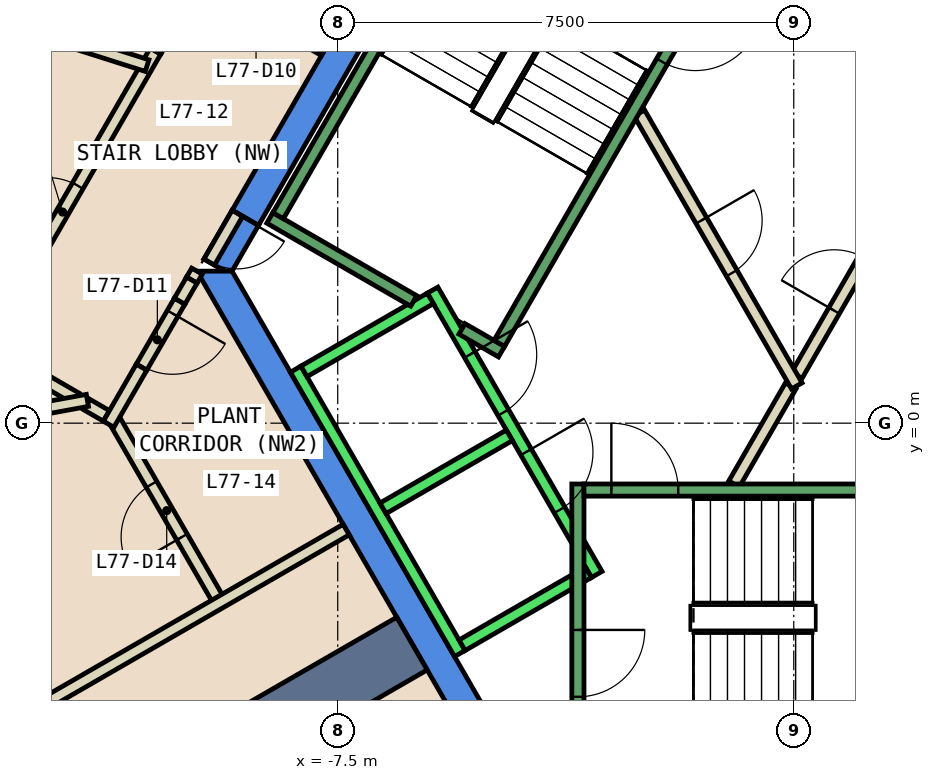
"""IFC4 building model, lengths in metres.
Left out: names, types, materials, properties, quantities, classifications, styles, units other than length and angle.
Written with IfcOpenShell. Run it as: python <this file> out.ifc"""

import sys

from ifc_helpers import new_model, si_unit, direction, frame, frame_2d, origin, place, context, subcontext, project, spatial, polyline, rectangle, outline, extrude, element, fill, save


model = new_model("IFC4")
c1 = context("Model", 3, precision=1e-05, world=origin(), true_north=direction((0.0, 1.0)))
c2 = subcontext(c1, "Body", "Model", "MODEL_VIEW")
j1 = project(units=[si_unit("LENGTHUNIT", "METRE"), si_unit("PLANEANGLEUNIT", "RADIAN")], contexts=[c1])
p1 = place(None, origin())
s1 = spatial("IfcSite", under=j1, at=p1, CompositionType="ELEMENT")
p2 = place(p1, origin())
s2 = spatial("IfcBuilding", under=s1, at=p2, CompositionType="ELEMENT")
p3 = place(p2, frame((0.0, 0.0, 326.0)))
s3 = spatial("IfcBuildingStorey", under=s2, at=p3, CompositionType="ELEMENT", Elevation=326.0)
p4 = place(p3, frame((0.0, 0.0, -0.6)))
e1 = element("IfcWall", 1, at=p4, inside=s3, PredefinedType="SHEAR", context=c2, shape_type="SweptSolid", body=[
    extrude(outline(polyline([(-9.236, 3.502), (-8.803, 3.253), (-4.619, 10.5), (-4.907, 11.0), (-9.236, 3.502)])), origin(), (0.0, 0.0, 1.0), 5.55),
])
p5 = place(p3, frame((0.0, 0.0, 3.6)))
e2 = element("IfcWall", 2, at=p5, inside=s3, PredefinedType="SHEAR", context=c2, shape_type="SweptSolid", body=[
    extrude(outline(polyline([(-9.7, 2.7), (-9.354, 2.5), (-9.238, 2.5), (-8.803, 3.253), (-9.236, 3.502), (-9.7, 2.7)])), origin(), (0.0, 0.0, 1.0), 1.35),
])
p6 = place(p3, frame((0.0, 0.0, -0.6)))
e3 = element("IfcWall", 3, at=p6, inside=s3, PredefinedType="SHEAR", context=c2, shape_type="SweptSolid", body=[
    extrude(outline(polyline([(-9.815, 2.5), (-4.907, -6.0), (-4.619, -5.5), (-9.238, 2.5), (-9.815, 2.5)])), origin(), (0.0, 0.0, 1.0), 5.55),
])
p7 = place(p3, frame((-6.279, -3.625, 0.0), z_axis=(0.0, 0.0, 1.0), x_axis=(-0.866025543801, -0.499999757484, 0.0)))
e4 = element("IfcWall", 4, at=p7, inside=s3, PredefinedType="SHEAR", context=c2, shape_type="SweptSolid", body=[
    extrude(rectangle(XDim=17.452, YDim=1.0, at=frame_2d((8.726, 0.0))), origin(), (0.0, 0.0, 1.0), 4.95),
])
p8 = place(p3, frame((-0.982, -1.0, 0.0), z_axis=(0.0, 0.0, 1.0), x_axis=(0.50024047865, 0.865886518847, 0.0)))
e5 = element("IfcWall", 5, at=p8, inside=s3, PredefinedType="PARTITIONING", context=c2, shape_type="SweptSolid", body=[
    extrude(rectangle(XDim=1.863, YDim=0.2, at=frame_2d((0.931, 0.0))), origin(), (0.0, 0.0, 1.0), 4.95),
])
p9 = place(p3, frame((0.05, 0.787, 0.0), z_axis=(0.0, 0.0, 1.0), x_axis=(0.499954076797, 0.866051915934, 0.0)))
e6 = element("IfcWall", 6, at=p9, inside=s3, PredefinedType="PARTITIONING", context=c2, shape_type="SweptSolid", body=[
    extrude(rectangle(XDim=3.558, YDim=0.2, at=frame_2d((1.779, 0.0))), origin(), (0.0, 0.0, 1.0), 4.95),
])
p10 = place(p9, frame((1.229, 0.0, 0.0)))
e7 = element("IfcOpeningElement", 7, at=p10, cuts=e6, PredefinedType="OPENING", context=c2, shape_type="SweptSolid", body=[
    extrude(rectangle(XDim=1.0, YDim=2.1, at=frame_2d((0.5, 1.05))), frame((0.0, 0.11, 0.0), z_axis=(0.0, -1.0, 0.0), x_axis=(1.0, 0.0, 0.0)), (0.0, 0.0, 1.0), 0.22),
])
p11 = place(p3, frame((-2.54, 5.1, 0.0), z_axis=(0.0, 0.0, 1.0), x_axis=(0.499925051871, -0.866068670783, 0.0)))
e8 = element("IfcWall", 8, at=p11, inside=s3, PredefinedType="PARTITIONING", context=c2, shape_type="SweptSolid", body=[
    extrude(rectangle(XDim=5.181, YDim=0.2, at=frame_2d((2.59, 0.0))), origin(), (0.0, 0.0, 1.0), 4.95),
])
p12 = place(p11, frame((2.04, 0.0, 0.0)))
e9 = element("IfcOpeningElement", 9, at=p12, cuts=e8, PredefinedType="OPENING", context=c2, shape_type="SweptSolid", body=[
    extrude(rectangle(XDim=1.0, YDim=2.1, at=frame_2d((0.5, 1.05))), frame((0.0, 0.11, 0.0), z_axis=(0.0, -1.0, 0.0), x_axis=(1.0, 0.0, 0.0)), (0.0, 0.0, 1.0), 0.22),
])
p13 = place(p3, frame((-9.796, 7.332, 0.0), z_axis=(0.0, 0.0, 1.0), x_axis=(0.865973769406, -0.500089422704, 0.0)))
e10 = element("IfcWall", 10, at=p13, inside=s3, PredefinedType="PARTITIONING", context=c2, shape_type="SweptSolid", body=[
    extrude(rectangle(XDim=2.399, YDim=0.2, at=frame_2d((1.2, 0.0))), origin(), (0.0, 0.0, 1.0), 4.95),
])
p14 = place(p13, frame((0.6, 0.0, 0.0)))
e11 = element("IfcOpeningElement", 11, at=p14, cuts=e10, PredefinedType="OPENING", context=c2, shape_type="SweptSolid", body=[
    extrude(rectangle(XDim=1.0, YDim=2.1, at=frame_2d((0.5, 1.05))), frame((0.0, 0.11, 0.0), z_axis=(0.0, -1.0, 0.0), x_axis=(1.0, 0.0, 0.0)), (0.0, 0.0, 1.0), 0.22),
])
p15 = place(p3, frame((-9.815, 2.5, 0.0), z_axis=(0.0, 0.0, 1.0), x_axis=(-0.5004692653, -0.865754303766, 0.0)))
e12 = element("IfcWall", 12, at=p15, inside=s3, PredefinedType="PARTITIONING", context=c2, shape_type="SweptSolid", body=[
    extrude(rectangle(XDim=0.17, YDim=0.2, at=frame_2d((0.085, 0.0))), origin(), (0.0, 0.0, 1.0), 2.4),
])
p16 = place(p3, frame((-11.802, 0.407, 0.0), z_axis=(0.0, 0.0, 1.0), x_axis=(-0.865911816314, 0.500196687681, 0.0)))
e13 = element("IfcWall", 13, at=p16, inside=s3, PredefinedType="PARTITIONING", context=c2, shape_type="SweptSolid", body=[
    extrude(rectangle(XDim=0.654, YDim=0.2, at=frame_2d((0.327, 0.0))), origin(), (0.0, 0.0, 1.0), 4.95),
])
p17 = place(p3, frame((-11.305, 0.12, 0.0), z_axis=(0.0, 0.0, 1.0), x_axis=(-0.865694957185, 0.500571914019, 0.0)))
e14 = element("IfcWall", 14, at=p17, inside=s3, PredefinedType="PARTITIONING", context=c2, shape_type="SweptSolid", body=[
    extrude(rectangle(XDim=0.373, YDim=0.2, at=frame_2d((0.187, 0.0))), origin(), (0.0, 0.0, 1.0), 4.95),
])
p18 = place(p3, frame((-9.44, -2.95, 0.0), z_axis=(0.0, 0.0, 1.0), x_axis=(-0.500008478926, 0.866020508419, 0.0)))
e15 = element("IfcWall", 15, at=p18, inside=s3, PredefinedType="PARTITIONING", context=c2, shape_type="SweptSolid", body=[
    extrude(rectangle(XDim=3.522, YDim=0.2, at=frame_2d((1.761, 0.0))), origin(), (0.0, 0.0, 1.0), 4.95),
])
p19 = place(p18, frame((1.245, 0.0, 0.0)))
e16 = element("IfcOpeningElement", 16, at=p19, cuts=e15, PredefinedType="OPENING", context=c2, shape_type="SweptSolid", body=[
    extrude(rectangle(XDim=1.0, YDim=2.1, at=frame_2d((0.5, 1.05))), frame((0.0, 0.11, 0.0), z_axis=(0.0, -1.0, 0.0), x_axis=(1.0, 0.0, 0.0)), (0.0, 0.0, 1.0), 0.22),
])
p20 = place(p3, frame((-11.617, 0.375, 0.0), z_axis=(0.0, 0.0, 1.0), x_axis=(-0.983680709819, -0.179922931086, 0.0)))
e17 = element("IfcWall", 17, at=p20, inside=s3, PredefinedType="PARTITIONING", context=c2, shape_type="SweptSolid", body=[
    extrude(rectangle(XDim=9.732, YDim=0.2, at=frame_2d((4.866, 0.0))), origin(), (0.0, 0.0, 1.0), 4.95),
])
p21 = place(p3, frame((-9.15, 3.452, 0.0), z_axis=(0.0, 0.0, 1.0), x_axis=(-0.500079945886, -0.865979242085, 0.0)))
e18 = element("IfcWall", 18, at=p21, inside=s3, PredefinedType="PARTITIONING", context=c2, shape_type="SweptSolid", body=[
    extrude(rectangle(XDim=0.926, YDim=0.2, at=frame_2d((0.463, 0.0))), origin(), (0.0, 0.0, 1.0), 2.4),
])
p22 = place(p21, frame((0.017, 0.0, 0.0)))
e19 = element("IfcOpeningElement", 19, at=p22, cuts=e18, PredefinedType="OPENING", context=c2, shape_type="SweptSolid", body=[
    extrude(rectangle(XDim=0.9, YDim=2.1, at=frame_2d((0.45, 1.05))), frame((0.0, 0.11, 0.0), z_axis=(0.0, -1.0, 0.0), x_axis=(1.0, 0.0, 0.0)), (0.0, 0.0, 1.0), 0.22),
])
p23 = place(p3, frame((-22.497, -10.489, 0.0), z_axis=(0.0, 0.0, 1.0), x_axis=(0.866019262169, 0.500010637439, 0.0)))
e20 = element("IfcWall", 20, at=p23, inside=s3, PredefinedType="PARTITIONING", context=c2, shape_type="SweptSolid", body=[
    extrude(rectangle(XDim=17.478, YDim=0.2, at=frame_2d((8.739, 0.0))), origin(), (0.0, 0.0, 1.0), 4.95),
])
p24 = place(p3, frame((-9.9, 2.353, 0.0), z_axis=(0.0, 0.0, 1.0), x_axis=(-0.499267785915, -0.866447735266, 0.0)))
e21 = element("IfcWall", 21, at=p24, inside=s3, PredefinedType="PARTITIONING", context=c2, shape_type="SweptSolid", body=[
    extrude(rectangle(XDim=0.403, YDim=0.2, at=frame_2d((0.201, 0.0))), origin(), (0.0, 0.0, 1.0), 4.95),
])
p25 = place(p3, frame((-10.101, 2.004, 0.0), z_axis=(0.0, 0.0, 1.0), x_axis=(-0.50008261738, -0.865977699363, 0.0)))
e22 = element("IfcWall", 22, at=p25, inside=s3, PredefinedType="PARTITIONING", context=c2, shape_type="SweptSolid", body=[
    extrude(rectangle(XDim=1.252, YDim=0.2, at=frame_2d((0.626, 0.0))), origin(), (0.0, 0.0, 1.0), 2.55),
])
p26 = place(p25, frame((0.231, 0.0, 0.0)))
e23 = element("IfcOpeningElement", 23, at=p26, cuts=e22, PredefinedType="OPENING", context=c2, shape_type="SweptSolid", body=[
    extrude(rectangle(XDim=1.0, YDim=2.1, at=frame_2d((0.5, 1.05))), frame((0.0, 0.11, 0.0), z_axis=(0.0, -1.0, 0.0), x_axis=(1.0, 0.0, 0.0)), (0.0, 0.0, 1.0), 0.22),
])
p27 = place(p3, frame((-10.727, 0.92, 0.0), z_axis=(0.0, 0.0, 1.0), x_axis=(-0.500021943523, -0.866012734315, 0.0)))
e24 = element("IfcWall", 24, at=p27, inside=s3, PredefinedType="PARTITIONING", context=c2, shape_type="SweptSolid", body=[
    extrude(rectangle(XDim=1.082, YDim=0.2, at=frame_2d((0.541, 0.0))), origin(), (0.0, 0.0, 1.0), 4.95),
])
p28 = place(p3, frame((-13.041, 1.711, 0.0), z_axis=(0.0, 0.0, 1.0), x_axis=(0.499853954338, 0.866109706869, 0.0)))
e25 = element("IfcWall", 25, at=p28, inside=s3, PredefinedType="PARTITIONING", context=c2, shape_type="SweptSolid", body=[
    extrude(rectangle(XDim=5.089, YDim=0.2, at=frame_2d((2.545, 0.0))), origin(), (0.0, 0.0, 1.0), 4.95),
])
p29 = place(p28, frame((1.533, 0.0, 0.0)))
e26 = element("IfcOpeningElement", 26, at=p29, cuts=e25, PredefinedType="OPENING", context=c2, shape_type="SweptSolid", body=[
    extrude(rectangle(XDim=1.0, YDim=2.1, at=frame_2d((0.5, 1.05))), frame((0.0, 0.11, 0.0), z_axis=(0.0, -1.0, 0.0), x_axis=(1.0, 0.0, 0.0)), (0.0, 0.0, 1.0), 0.22),
])
p30 = place(p3, frame((-10.497, 6.119, 0.0), z_axis=(0.0, 0.0, 1.0), x_axis=(0.499909789979, 0.8660774803, 0.0)))
e27 = element("IfcWall", 27, at=p30, inside=s3, PredefinedType="PARTITIONING", context=c2, shape_type="SweptSolid", body=[
    extrude(rectangle(XDim=0.94, YDim=0.2, at=frame_2d((0.47, 0.0))), origin(), (0.0, 0.0, 1.0), 2.55),
])
p31 = place(p3, frame((-16.245, 7.663, 0.0), z_axis=(0.0, 0.0, 1.0), x_axis=(0.953015609999, -0.302921189583, 0.0)))
e28 = element("IfcWall", 28, at=p31, inside=s3, PredefinedType="PARTITIONING", context=c2, shape_type="SweptSolid", body=[
    extrude(rectangle(XDim=5.887, YDim=0.2, at=frame_2d((2.943, 0.0))), origin(), (0.0, 0.0, 1.0), 4.95),
])
p32 = place(p3, frame((-5.94, 2.188, 0.0), z_axis=(0.0, 0.0, 1.0), x_axis=(0.500034260056, -0.866005622828, 0.0)))
e29 = element("IfcWall", 29, at=p32, inside=s3, PredefinedType="STANDARD", context=c2, shape_type="SweptSolid", body=[
    extrude(rectangle(XDim=5.399, YDim=0.2, at=frame_2d((2.7, 0.0))), origin(), (0.0, 0.0, 1.0), 4.95),
])
p33 = place(p32, frame((3.075, 0.0, 0.0)))
e30 = element("IfcOpeningElement", 30, at=p33, cuts=e29, PredefinedType="OPENING", context=c2, shape_type="SweptSolid", body=[
    extrude(rectangle(XDim=1.1, YDim=2.1, at=frame_2d((0.55, 1.05))), frame((0.0, 0.11, 0.0), z_axis=(0.0, -1.0, 0.0), x_axis=(1.0, 0.0, 0.0)), (0.0, 0.0, 1.0), 0.22),
])
p34 = place(p32, frame((1.225, 0.0, 0.0)))
e31 = element("IfcOpeningElement", 31, at=p34, cuts=e29, PredefinedType="OPENING", context=c2, shape_type="SweptSolid", body=[
    extrude(rectangle(XDim=1.1, YDim=2.1, at=frame_2d((0.55, 1.05))), frame((0.0, 0.11, 0.0), z_axis=(0.0, -1.0, 0.0), x_axis=(1.0, 0.0, 0.0)), (0.0, 0.0, 1.0), 0.22),
])
p35 = place(p3, frame((-8.192, 0.888, 0.0), z_axis=(0.0, 0.0, 1.0), x_axis=(0.500034260056, -0.866005622828, 0.0)))
e32 = element("IfcWall", 32, at=p35, inside=s3, PredefinedType="STANDARD", context=c2, shape_type="SweptSolid", body=[
    extrude(rectangle(XDim=5.399, YDim=0.2, at=frame_2d((2.7, 0.0))), origin(), (0.0, 0.0, 1.0), 4.95),
])
for number, where, z_axis, x_axis in (
    (33, (-5.977, 2.052, 0.0), (0.0, 0.0, 1.0), (-0.866, -0.5, 0.0)),
    (34, (-4.677, -0.2, 0.0), (0.0, 0.0, 1.0), (-0.866, -0.5, 0.0)),
):
    element("IfcWall", number, at=place(p3, frame(where, z_axis=z_axis, x_axis=x_axis)), inside=s3, PredefinedType="STANDARD", context=c2, shape_type="SweptSolid", body=[
        extrude(rectangle(XDim=2.399, YDim=0.2, at=frame_2d((1.2, 0.0))), origin(), (0.0, 0.0, 1.0), 4.95),
    ])
p36 = place(p3, frame((-3.377, -2.452, 0.0), z_axis=(0.0, 0.0, 1.0), x_axis=(-0.865955154139, -0.50012165622, 0.0)))
e35 = element("IfcWall", 35, at=p36, inside=s3, PredefinedType="STANDARD", context=c2, shape_type="SweptSolid", body=[
    extrude(rectangle(XDim=2.4, YDim=0.2, at=frame_2d((1.2, 0.0))), origin(), (0.0, 0.0, 1.0), 4.95),
])
p37 = place(p3, frame((-3.55, -1.0, 0.0), z_axis=(0.0, 0.0, 1.0), x_axis=(0.0, -1.0, 0.0)))
e36 = element("IfcWall", 36, at=p37, inside=s3, PredefinedType="STANDARD", context=c2, shape_type="SweptSolid", body=[
    extrude(rectangle(XDim=4.4, YDim=0.2, at=frame_2d((2.2, 0.0))), origin(), (0.0, 0.0, 1.0), 4.95),
])
p38 = place(p37, frame((2.4, 0.0, 0.0)))
e37 = element("IfcOpeningElement", 37, at=p38, cuts=e36, PredefinedType="OPENING", context=c2, shape_type="SweptSolid", body=[
    extrude(rectangle(XDim=1.1, YDim=2.2, at=frame_2d((0.55, 1.1))), frame((0.0, 0.11, 0.0), z_axis=(0.0, -1.0, 0.0), x_axis=(1.0, 0.0, 0.0)), (0.0, 0.0, 1.0), 0.22),
])
p39 = place(p3, frame((-3.45, -1.1, 0.0), z_axis=(0.0, 0.0, 1.0), x_axis=(1.0, 0.0, 0.0)))
e38 = element("IfcWall", 38, at=p39, inside=s3, PredefinedType="STANDARD", context=c2, shape_type="SweptSolid", body=[
    extrude(rectangle(XDim=6.9, YDim=0.2, at=frame_2d((3.45, 0.0))), origin(), (0.0, 0.0, 1.0), 4.95),
])
p40 = place(p39, frame((0.45, 0.0, 0.0)))
e39 = element("IfcOpeningElement", 39, at=p40, cuts=e38, PredefinedType="OPENING", context=c2, shape_type="SweptSolid", body=[
    extrude(rectangle(XDim=1.1, YDim=2.2, at=frame_2d((0.55, 1.1))), frame((0.0, 0.11, 0.0), z_axis=(0.0, -1.0, 0.0), x_axis=(1.0, 0.0, 0.0)), (0.0, 0.0, 1.0), 0.22),
])
p41 = place(p3, frame((-6.25, 2.01, 0.0), z_axis=(0.0, 0.0, 1.0), x_axis=(-0.86611865017, 0.499838457731, 0.0)))
e40 = element("IfcWall", 40, at=p41, inside=s3, PredefinedType="STANDARD", context=c2, shape_type="SweptSolid", body=[
    extrude(rectangle(XDim=2.733, YDim=0.2, at=frame_2d((1.366, 0.0))), origin(), (0.0, 0.0, 1.0), 4.95),
])
p42 = place(p3, frame((-4.806, 1.176, 0.0), z_axis=(0.0, 0.0, 1.0), x_axis=(-0.866558586415, 0.499075361355, 0.0)))
e41 = element("IfcWall", 41, at=p42, inside=s3, PredefinedType="STANDARD", context=c2, shape_type="SweptSolid", body=[
    extrude(rectangle(XDim=0.751, YDim=0.2, at=frame_2d((0.376, 0.0))), origin(), (0.0, 0.0, 1.0), 4.95),
])
p43 = place(p3, frame((-1.393, 7.288, 0.0), z_axis=(0.0, 0.0, 1.0), x_axis=(-0.499963383562, -0.866046543262, 0.0)))
e42 = element("IfcWall", 42, at=p43, inside=s3, PredefinedType="STANDARD", context=c2, shape_type="SweptSolid", body=[
    extrude(rectangle(XDim=6.9, YDim=0.2, at=frame_2d((3.45, 0.0))), origin(), (0.0, 0.0, 1.0), 4.95),
])
p44 = place(p43, frame((0.45, 0.0, 0.0)))
e43 = element("IfcOpeningElement", 43, at=p44, cuts=e42, PredefinedType="OPENING", context=c2, shape_type="SweptSolid", body=[
    extrude(rectangle(XDim=1.1, YDim=2.2, at=frame_2d((0.55, 1.1))), frame((0.0, 0.11, 0.0), z_axis=(0.0, -1.0, 0.0), x_axis=(1.0, 0.0, 0.0)), (0.0, 0.0, 1.0), 0.22),
])
p45 = place(p3, frame((-5.03, 9.388, 0.0), z_axis=(0.0, 0.0, 1.0), x_axis=(-0.499978703459, -0.866037698999, 0.0)))
e44 = element("IfcWall", 44, at=p45, inside=s3, PredefinedType="STANDARD", context=c2, shape_type="SweptSolid", body=[
    extrude(rectangle(XDim=6.9, YDim=0.2, at=frame_2d((3.45, 0.0))), origin(), (0.0, 0.0, 1.0), 4.95),
])
p46 = place(p26, origin())
e45 = element("IfcDoor", 45, at=p46, inside=s3, OperationType="SINGLE_SWING_RIGHT", PredefinedType="DOOR", context=c2, shape_type="SweptSolid", body=[
    extrude(rectangle(XDim=1.0, YDim=2.1, at=frame_2d((0.5, 1.05))), frame((0.0, 0.025, 0.0), z_axis=(0.0, -1.0, 0.0), x_axis=(1.0, 0.0, 0.0)), (0.0, 0.0, 1.0), 0.05),
])
fill(e23, e45)
p47 = place(p29, origin())
e46 = element("IfcDoor", 46, at=p47, inside=s3, OperationType="SINGLE_SWING_LEFT", PredefinedType="DOOR", context=c2, shape_type="SweptSolid", body=[
    extrude(rectangle(XDim=1.0, YDim=2.1, at=frame_2d((0.5, 1.05))), frame((0.0, 0.025, 0.0), z_axis=(0.0, -1.0, 0.0), x_axis=(1.0, 0.0, 0.0)), (0.0, 0.0, 1.0), 0.05),
])
fill(e26, e46)
p48 = place(p19, origin())
e47 = element("IfcDoor", 47, at=p48, inside=s3, OperationType="SINGLE_SWING_LEFT", PredefinedType="DOOR", context=c2, shape_type="SweptSolid", body=[
    extrude(rectangle(XDim=1.0, YDim=2.1, at=frame_2d((0.5, 1.05))), frame((0.0, 0.025, 0.0), z_axis=(0.0, -1.0, 0.0), x_axis=(1.0, 0.0, 0.0)), (0.0, 0.0, 1.0), 0.05),
])
fill(e16, e47)
p49 = place(p10, origin())
e48 = element("IfcDoor", 48, at=p49, inside=s3, OperationType="SINGLE_SWING_RIGHT", PredefinedType="DOOR", context=c2, shape_type="SweptSolid", body=[
    extrude(rectangle(XDim=1.0, YDim=2.1, at=frame_2d((0.5, 1.05))), frame((0.0, 0.025, 0.0), z_axis=(0.0, -1.0, 0.0), x_axis=(1.0, 0.0, 0.0)), (0.0, 0.0, 1.0), 0.05),
])
fill(e7, e48)
p50 = place(p12, origin())
e49 = element("IfcDoor", 49, at=p50, inside=s3, OperationType="SINGLE_SWING_RIGHT", PredefinedType="DOOR", context=c2, shape_type="SweptSolid", body=[
    extrude(rectangle(XDim=1.0, YDim=2.1, at=frame_2d((0.5, 1.05))), frame((0.0, 0.025, 0.0), z_axis=(0.0, -1.0, 0.0), x_axis=(1.0, 0.0, 0.0)), (0.0, 0.0, 1.0), 0.05),
])
fill(e9, e49)
p51 = place(p22, origin())
e50 = element("IfcDoor", 50, at=p51, inside=s3, OperationType="SINGLE_SWING_LEFT", PredefinedType="DOOR", context=c2, shape_type="SweptSolid", body=[
    extrude(rectangle(XDim=0.9, YDim=2.1, at=frame_2d((0.45, 1.05))), frame((0.0, 0.025, 0.0), z_axis=(0.0, -1.0, 0.0), x_axis=(1.0, 0.0, 0.0)), (0.0, 0.0, 1.0), 0.05),
])
fill(e19, e50)
p52 = place(p33, origin())
e51 = element("IfcDoor", 51, at=p52, inside=s3, OperationType="SLIDING_TO_LEFT", PredefinedType="DOOR", context=c2, shape_type="SweptSolid", body=[
    extrude(rectangle(XDim=1.1, YDim=2.1, at=frame_2d((0.55, 1.05))), frame((0.0, 0.025, 0.0), z_axis=(0.0, -1.0, 0.0), x_axis=(1.0, 0.0, 0.0)), (0.0, 0.0, 1.0), 0.05),
])
fill(e30, e51)
p53 = place(p34, origin())
e52 = element("IfcDoor", 52, at=p53, inside=s3, OperationType="SLIDING_TO_LEFT", PredefinedType="DOOR", context=c2, shape_type="SweptSolid", body=[
    extrude(rectangle(XDim=1.1, YDim=2.1, at=frame_2d((0.55, 1.05))), frame((0.0, 0.025, 0.0), z_axis=(0.0, -1.0, 0.0), x_axis=(1.0, 0.0, 0.0)), (0.0, 0.0, 1.0), 0.05),
])
fill(e31, e52)
p54 = place(p40, origin())
e53 = element("IfcDoor", 53, at=p54, inside=s3, OperationType="SINGLE_SWING_LEFT", PredefinedType="DOOR", context=c2, shape_type="SweptSolid", body=[
    extrude(rectangle(XDim=1.1, YDim=2.2, at=frame_2d((0.55, 1.1))), frame((0.0, 0.025, 0.0), z_axis=(0.0, -1.0, 0.0), x_axis=(1.0, 0.0, 0.0)), (0.0, 0.0, 1.0), 0.05),
])
fill(e39, e53)
p55 = place(p38, origin())
e54 = element("IfcDoor", 54, at=p55, inside=s3, OperationType="SINGLE_SWING_LEFT", PredefinedType="DOOR", context=c2, shape_type="SweptSolid", body=[
    extrude(rectangle(XDim=1.1, YDim=2.2, at=frame_2d((0.55, 1.1))), frame((0.0, 0.025, 0.0), z_axis=(0.0, -1.0, 0.0), x_axis=(1.0, 0.0, 0.0)), (0.0, 0.0, 1.0), 0.05),
])
fill(e37, e54)
p56 = place(p44, origin())
e55 = element("IfcDoor", 55, at=p56, inside=s3, OperationType="SINGLE_SWING_LEFT", PredefinedType="DOOR", context=c2, shape_type="SweptSolid", body=[
    extrude(rectangle(XDim=1.1, YDim=2.2, at=frame_2d((0.55, 1.1))), frame((0.0, 0.025, 0.0), z_axis=(0.0, -1.0, 0.0), x_axis=(1.0, 0.0, 0.0)), (0.0, 0.0, 1.0), 0.05),
])
fill(e43, e55)
save(model, sys.argv[1])
